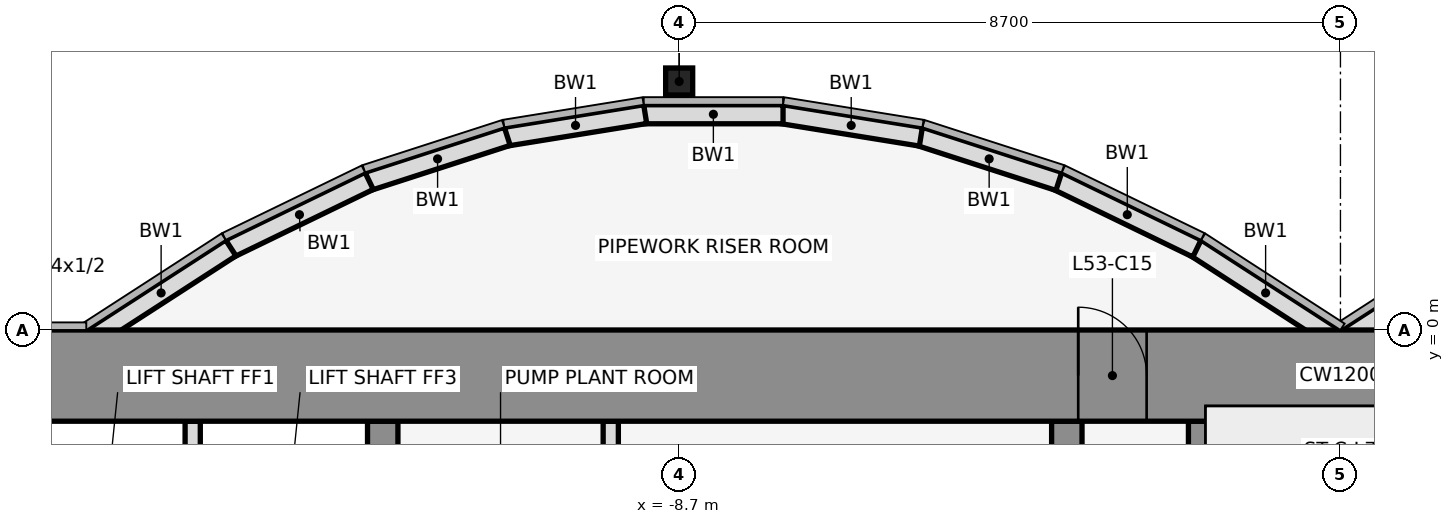
"""IFC4 building model, lengths in metres.
Left out: names, types, materials, properties, quantities, classifications, styles, units other than length and angle.
Written with IfcOpenShell. Run it as: python <this file> out.ifc"""

import sys

from ifc_helpers import new_model, si_unit, direction, frame, frame_2d, origin, origin_2d, place, context, subcontext, project, spatial, rectangle, hollow_rectangle, extrude, element, fill, save


model = new_model("IFC4")
c1 = context("Model", 3, precision=1e-05, world=origin(), true_north=direction((0.0, 1.0)))
c2 = subcontext(c1, "Body", "Model", "MODEL_VIEW")
j1 = project(units=[si_unit("LENGTHUNIT", "METRE"), si_unit("PLANEANGLEUNIT", "RADIAN")], contexts=[c1])
p1 = place(None, origin())
s1 = spatial("IfcSite", under=j1, at=p1, CompositionType="ELEMENT")
p2 = place(p1, origin())
s2 = spatial("IfcBuilding", under=s1, at=p2, CompositionType="ELEMENT")
p3 = place(p2, frame((0.0, 0.0, 236.0)))
s3 = spatial("IfcBuildingStorey", under=s2, at=p3, CompositionType="ELEMENT", Elevation=236.0)
p4 = place(p3, frame((-8.7, 3.269, 0.0), z_axis=(0.0, 0.0, 1.0), x_axis=(1.0, 0.0, 0.0)))
e1 = element("IfcColumn", 1, at=p4, inside=s3, PredefinedType="COLUMN", context=c2, shape_type="SweptSolid", body=[
    extrude(hollow_rectangle(XDim=0.356, YDim=0.356, WallThickness=0.012, at=origin_2d()), origin(), (0.0, 0.0, 1.0), 5.4),
])
for number, where, z_axis, x_axis in (
    (2, (1.901, 1.08, 0.0), (0.0, 0.0, 1.0), (-0.84, -0.543, 0.0)),
    (3, (-0.068, -0.105, 0.0), (0.0, 0.0, 1.0), (-0.84, 0.543, 0.0)),
):
    element("IfcWall", number, at=place(p3, frame(where, z_axis=z_axis, x_axis=x_axis)), inside=s3, PredefinedType="STANDARD", context=c2, shape_type="SweptSolid", body=[
        extrude(rectangle(XDim=2.183, YDim=0.25, at=frame_2d((1.091, 0.0))), origin(), (0.0, 0.0, 1.0), 5.25),
    ])
p5 = place(p3, frame((-1.888, 1.073, 0.0), z_axis=(0.0, 0.0, 1.0), x_axis=(-0.89982408427, 0.436252928206, 0.0)))
e4 = element("IfcWall", 4, at=p5, inside=s3, PredefinedType="STANDARD", context=c2, shape_type="SweptSolid", body=[
    extrude(rectangle(XDim=2.038, YDim=0.25, at=frame_2d((1.019, 0.0))), origin(), (0.0, 0.0, 1.0), 5.25),
])
p6 = place(p3, frame((-3.705, 1.955, 0.0), z_axis=(0.0, 0.0, 1.0), x_axis=(-0.951495806175, 0.307661714928, 0.0)))
e5 = element("IfcWall", 5, at=p6, inside=s3, PredefinedType="STANDARD", context=c2, shape_type="SweptSolid", body=[
    extrude(rectangle(XDim=1.927, YDim=0.25, at=frame_2d((0.963, 0.0))), origin(), (0.0, 0.0, 1.0), 5.25),
])
p7 = place(p3, frame((-5.52, 2.543, 0.0), z_axis=(0.0, 0.0, 1.0), x_axis=(-0.987181718931, 0.159600293885, 0.0)))
e6 = element("IfcWall", 6, at=p7, inside=s3, PredefinedType="STANDARD", context=c2, shape_type="SweptSolid", body=[
    extrude(rectangle(XDim=1.857, YDim=0.25, at=frame_2d((0.929, 0.0))), origin(), (0.0, 0.0, 1.0), 5.25),
])
p8 = place(p3, frame((-7.333, 2.838, 0.0), z_axis=(0.0, 0.0, 1.0), x_axis=(-1.0, 0.0, 0.0)))
e7 = element("IfcWall", 7, at=p8, inside=s3, PredefinedType="STANDARD", context=c2, shape_type="SweptSolid", body=[
    extrude(rectangle(XDim=1.833, YDim=0.25, at=frame_2d((0.917, 0.0))), origin(), (0.0, 0.0, 1.0), 5.25),
])
p9 = place(p3, frame((-9.147, 2.84, 0.0), z_axis=(0.0, 0.0, 1.0), x_axis=(-0.987181718931, -0.159600293885, 0.0)))
e8 = element("IfcWall", 8, at=p9, inside=s3, PredefinedType="STANDARD", context=c2, shape_type="SweptSolid", body=[
    extrude(rectangle(XDim=1.857, YDim=0.25, at=frame_2d((0.929, 0.0))), origin(), (0.0, 0.0, 1.0), 5.25),
])
p10 = place(p3, frame((-10.962, 2.548, 0.0), z_axis=(0.0, 0.0, 1.0), x_axis=(-0.951495806175, -0.307661714928, 0.0)))
e9 = element("IfcWall", 9, at=p10, inside=s3, PredefinedType="STANDARD", context=c2, shape_type="SweptSolid", body=[
    extrude(rectangle(XDim=1.927, YDim=0.25, at=frame_2d((0.963, 0.0))), origin(), (0.0, 0.0, 1.0), 5.25),
])
p11 = place(p3, frame((-12.779, 1.962, 0.0), z_axis=(0.0, 0.0, 1.0), x_axis=(-0.89982408427, -0.436252928206, 0.0)))
e10 = element("IfcWall", 10, at=p11, inside=s3, PredefinedType="STANDARD", context=c2, shape_type="SweptSolid", body=[
    extrude(rectangle(XDim=2.038, YDim=0.25, at=frame_2d((1.019, 0.0))), origin(), (0.0, 0.0, 1.0), 5.25),
])
p12 = place(p3, frame((-14.599, 1.08, 0.0), z_axis=(0.0, 0.0, 1.0), x_axis=(-0.83981312244, -0.542875602121, 0.0)))
e11 = element("IfcWall", 11, at=p12, inside=s3, PredefinedType="STANDARD", context=c2, shape_type="SweptSolid", body=[
    extrude(rectangle(XDim=2.183, YDim=0.25, at=frame_2d((1.091, 0.0))), origin(), (0.0, 0.0, 1.0), 5.25),
])
p13 = place(p3, frame((-15.1, -4.6, 0.0), z_axis=(0.0, 0.0, 1.0), x_axis=(0.0, 1.0, 0.0)))
e12 = element("IfcWall", 12, at=p13, inside=s3, PredefinedType="PARTITIONING", context=c2, shape_type="SweptSolid", body=[
    extrude(rectangle(XDim=3.4, YDim=0.2, at=frame_2d((1.7, 0.0))), origin(), (0.0, 0.0, 1.0), 4.318),
])
p14 = place(p3, frame((-12.6, -11.8, 0.0), z_axis=(0.0, 0.0, 1.0), x_axis=(0.0, 1.0, 0.0)))
e13 = element("IfcWall", 13, at=p14, inside=s3, PredefinedType="SHEAR", context=c2, shape_type="SweptSolid", body=[
    extrude(rectangle(XDim=10.6, YDim=0.4, at=frame_2d((5.3, 0.0))), origin(), (0.0, 0.0, 1.0), 5.4),
])
p15 = place(p14, frame((4.75, 0.0, 0.0)))
e14 = element("IfcOpeningElement", 14, at=p15, cuts=e13, PredefinedType="OPENING", context=c2, shape_type="SweptSolid", body=[
    extrude(rectangle(XDim=1.1, YDim=2.1, at=frame_2d((0.55, 1.05))), frame((0.0, 0.212, 0.0), z_axis=(0.0, -1.0, 0.0), x_axis=(1.0, 0.0, 0.0)), (0.0, 0.0, 1.0), 0.424),
])
p16 = place(p3, frame((-9.6, -4.6, 0.0), z_axis=(0.0, 0.0, 1.0), x_axis=(0.0, 1.0, 0.0)))
e15 = element("IfcWall", 15, at=p16, inside=s3, PredefinedType="PARTITIONING", context=c2, shape_type="SweptSolid", body=[
    extrude(rectangle(XDim=3.4, YDim=0.2, at=frame_2d((1.7, 0.0))), origin(), (0.0, 0.0, 1.0), 4.318),
])
p17 = place(p3, frame((-3.6, -11.8, 0.0), z_axis=(0.0, 0.0, 1.0), x_axis=(0.0, 1.0, 0.0)))
e16 = element("IfcWall", 16, at=p17, inside=s3, PredefinedType="SHEAR", context=c2, shape_type="SweptSolid", body=[
    extrude(rectangle(XDim=10.6, YDim=0.4, at=frame_2d((5.3, 0.0))), origin(), (0.0, 0.0, 1.0), 5.4),
])
p18 = place(p17, frame((4.85, 0.0, 0.0)))
e17 = element("IfcOpeningElement", 17, at=p18, cuts=e16, PredefinedType="OPENING", context=c2, shape_type="SweptSolid", body=[
    extrude(rectangle(XDim=0.9, YDim=2.1, at=frame_2d((0.45, 1.05))), frame((0.0, 0.212, 0.0), z_axis=(0.0, -1.0, 0.0), x_axis=(1.0, 0.0, 0.0)), (0.0, 0.0, 1.0), 0.424),
])
p19 = place(p3, frame((-1.8, -11.8, 0.0), z_axis=(0.0, 0.0, 1.0), x_axis=(0.0, 1.0, 0.0)))
e18 = element("IfcWall", 18, at=p19, inside=s3, PredefinedType="SHEAR", context=c2, shape_type="SweptSolid", body=[
    extrude(rectangle(XDim=10.6, YDim=0.4, at=frame_2d((5.3, 0.0))), origin(), (0.0, 0.0, 1.0), 5.4),
])
p20 = place(p3, frame((-22.0, -0.6, 0.0), z_axis=(0.0, 0.0, 1.0), x_axis=(1.0, 0.0, 0.0)))
e19 = element("IfcWall", 19, at=p20, inside=s3, PredefinedType="SHEAR", context=c2, shape_type="SweptSolid", body=[
    extrude(rectangle(XDim=44.0, YDim=1.2, at=frame_2d((22.0, 0.0))), origin(), (0.0, 0.0, 1.0), 5.4),
])
p21 = place(p20, frame((18.55, 0.0, 0.0)))
e20 = element("IfcOpeningElement", 20, at=p21, cuts=e19, PredefinedType="OPENING", context=c2, shape_type="SweptSolid", body=[
    extrude(rectangle(XDim=0.9, YDim=2.1, at=frame_2d((0.45, 1.05))), frame((0.0, 0.612, 0.0), z_axis=(0.0, -1.0, 0.0), x_axis=(1.0, 0.0, 0.0)), (0.0, 0.0, 1.0), 1.224),
])
p22 = place(p20, frame((24.55, 0.0, 0.0)))
e21 = element("IfcOpeningElement", 21, at=p22, cuts=e19, PredefinedType="OPENING", context=c2, shape_type="SweptSolid", body=[
    extrude(rectangle(XDim=0.9, YDim=2.1, at=frame_2d((0.45, 1.05))), frame((0.0, 0.612, 0.0), z_axis=(0.0, -1.0, 0.0), x_axis=(1.0, 0.0, 0.0)), (0.0, 0.0, 1.0), 1.224),
])
p23 = place(p21, origin())
e22 = element("IfcDoor", 22, at=p23, inside=s3, OperationType="SINGLE_SWING_LEFT", PredefinedType="DOOR", context=c2, shape_type="SweptSolid", body=[
    extrude(rectangle(XDim=0.9, YDim=2.1, at=frame_2d((0.45, 1.05))), frame((0.0, 0.025, 0.0), z_axis=(0.0, -1.0, 0.0), x_axis=(1.0, 0.0, 0.0)), (0.0, 0.0, 1.0), 0.05),
])
fill(e20, e22)
save(model, sys.argv[1])
